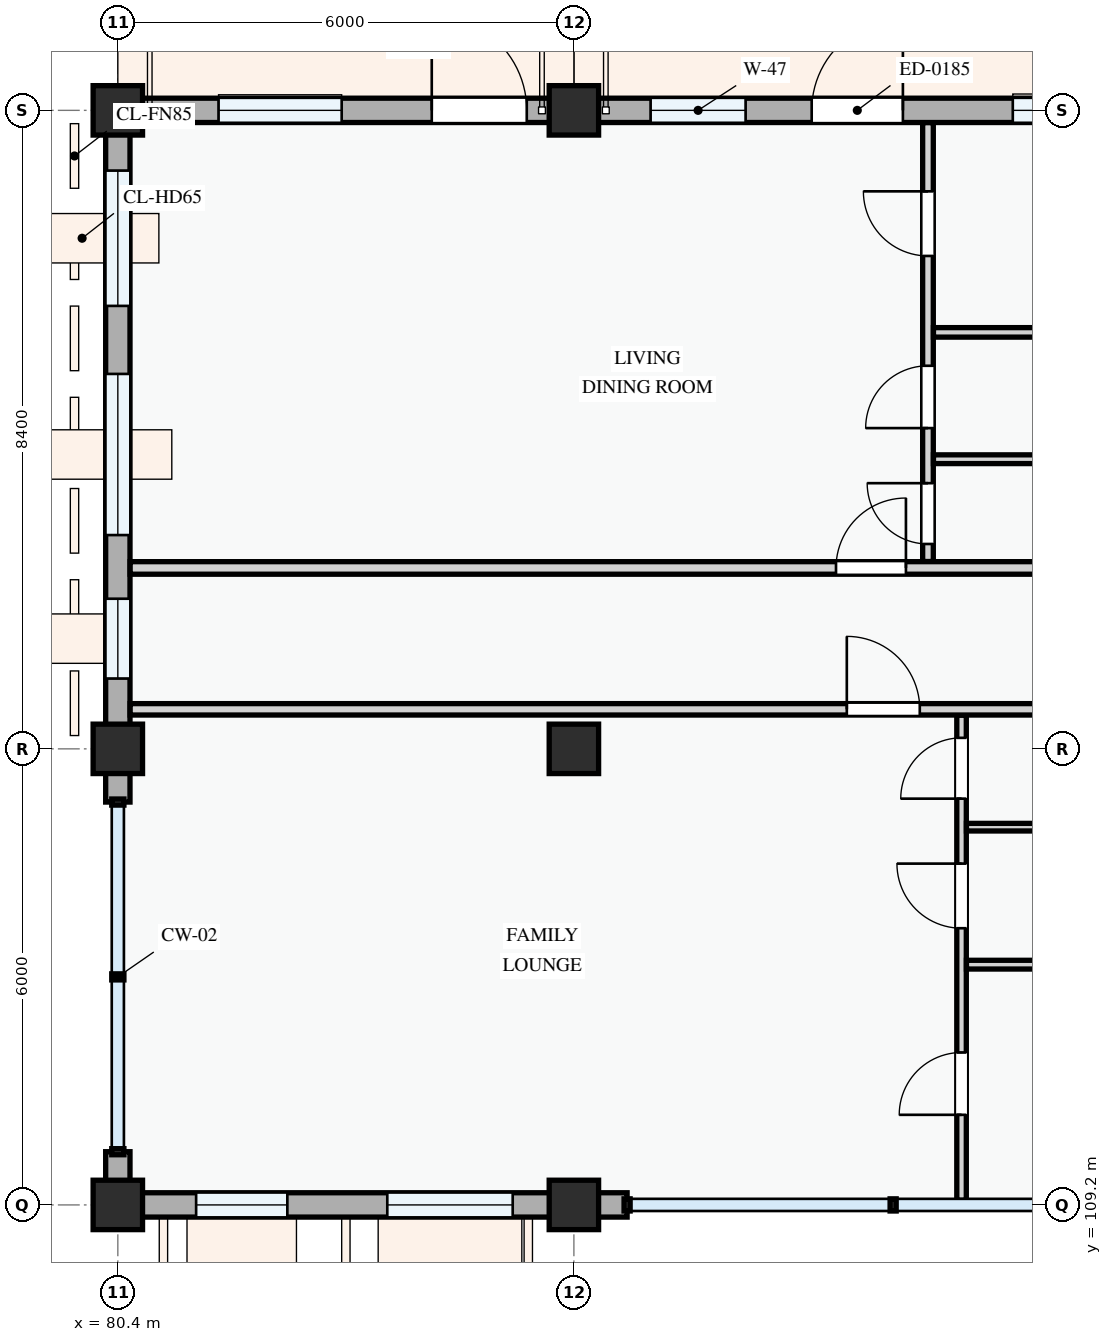
"""IFC4 building model, lengths in metres.
Left out: names, types, materials, properties, quantities, classifications, styles, units other than length and angle.
Written with IfcOpenShell. Run it as: python <this file> out.ifc"""

import sys

from ifc_helpers import new_model, si_unit, direction, frame, frame_2d, origin, origin_2d, place, context, subcontext, project, spatial, rectangle, extrude, element, fill, save


model = new_model("IFC4")
c1 = context("Model", 3, precision=1e-05, world=origin(), true_north=direction((0.0, 1.0)))
c2 = subcontext(c1, "Body", "Model", "MODEL_VIEW")
j1 = project(units=[si_unit("LENGTHUNIT", "METRE"), si_unit("PLANEANGLEUNIT", "RADIAN")], contexts=[c1])
p1 = place(None, origin())
s1 = spatial("IfcSite", under=j1, at=p1, CompositionType="ELEMENT")
p2 = place(p1, origin())
s2 = spatial("IfcBuilding", under=s1, at=p2, CompositionType="ELEMENT")
p3 = place(p2, frame((0.0, 0.0, 18.0)))
s3 = spatial("IfcBuildingStorey", under=s2, at=p3, CompositionType="ELEMENT", Elevation=18.0)
for number, where, z_axis, x_axis in (
    (1, (80.4, 109.2, 0.0), (0.0, 0.0, 1.0), (1.0, 0.0, 0.0)),
    (2, (80.4, 115.2, 0.0), (0.0, 0.0, 1.0), (1.0, 0.0, 0.0)),
    (3, (80.4, 123.6, 0.0), (0.0, 0.0, 1.0), (1.0, 0.0, 0.0)),
    (4, (86.4, 109.2, 0.0), (0.0, 0.0, 1.0), (1.0, 0.0, 0.0)),
    (5, (86.4, 115.2, 0.0), (0.0, 0.0, 1.0), (1.0, 0.0, 0.0)),
    (6, (86.4, 123.6, 0.0), (0.0, 0.0, 1.0), (1.0, 0.0, 0.0)),
):
    element("IfcColumn", number, at=place(p3, frame(where, z_axis=z_axis, x_axis=x_axis)), inside=s3, PredefinedType="COLUMN", context=c2, shape_type="SweptSolid", body=[
        extrude(rectangle(XDim=0.65, YDim=0.65, at=origin_2d()), origin(), (0.0, 0.0, 1.0), 3.3),
    ])
p4 = place(p3, frame((94.8, 123.6, 0.0), z_axis=(0.0, 0.0, 1.0), x_axis=(-1.0, 0.0, 0.0)))
e7 = element("IfcWall", 7, at=p4, inside=s3, PredefinedType="STANDARD", context=c2, shape_type="SweptSolid", body=[
    extrude(rectangle(XDim=8.4, YDim=0.32, at=frame_2d((4.2, 0.0))), origin(), (0.0, 0.0, 1.0), 2.375),
])
p5 = place(p4, frame((4.072, 0.0, 0.0)))
e8 = element("IfcOpeningElement", 8, at=p5, cuts=e7, PredefinedType="OPENING", context=c2, shape_type="SweptSolid", body=[
    extrude(rectangle(XDim=1.2, YDim=2.15, at=frame_2d((0.6, 1.075))), frame((0.0, 0.17, 0.0), z_axis=(0.0, -1.0, 0.0), x_axis=(1.0, 0.0, 0.0)), (0.0, 0.0, 1.0), 0.34),
])
p6 = place(p4, frame((1.306, 0.0, 0.78)))
e9 = element("IfcOpeningElement", 9, at=p6, cuts=e7, PredefinedType="OPENING", context=c2, shape_type="SweptSolid", body=[
    extrude(rectangle(XDim=1.32, YDim=1.35, at=frame_2d((0.66, 0.675))), frame((0.0, 0.17, 0.0), z_axis=(0.0, -1.0, 0.0), x_axis=(1.0, 0.0, 0.0)), (0.0, 0.0, 1.0), 0.34),
])
p7 = place(p4, frame((6.141, 0.0, 0.78)))
e10 = element("IfcOpeningElement", 10, at=p7, cuts=e7, PredefinedType="OPENING", context=c2, shape_type="SweptSolid", body=[
    extrude(rectangle(XDim=1.25, YDim=1.45, at=frame_2d((0.625, 0.725))), frame((0.0, 0.17, 0.0), z_axis=(0.0, -1.0, 0.0), x_axis=(1.0, 0.0, 0.0)), (0.0, 0.0, 1.0), 0.34),
])
p8 = place(p3, frame((86.4, 123.6, 0.0), z_axis=(0.0, 0.0, 1.0), x_axis=(-1.0, 0.0, 0.0)))
e11 = element("IfcWall", 11, at=p8, inside=s3, PredefinedType="STANDARD", context=c2, shape_type="SweptSolid", body=[
    extrude(rectangle(XDim=6.0, YDim=0.32, at=frame_2d((3.0, 0.0))), origin(), (0.0, 0.0, 1.0), 2.475),
])
p9 = place(p8, frame((0.62, 0.0, 0.0)))
e12 = element("IfcOpeningElement", 12, at=p9, cuts=e11, PredefinedType="OPENING", context=c2, shape_type="SweptSolid", body=[
    extrude(rectangle(XDim=1.25, YDim=2.2, at=frame_2d((0.625, 1.1))), frame((0.0, 0.17, 0.0), z_axis=(0.0, -1.0, 0.0), x_axis=(1.0, 0.0, 0.0)), (0.0, 0.0, 1.0), 0.34),
])
p10 = place(p8, frame((3.055, 0.0, 0.78)))
e13 = element("IfcOpeningElement", 13, at=p10, cuts=e11, PredefinedType="OPENING", context=c2, shape_type="SweptSolid", body=[
    extrude(rectangle(XDim=1.62, YDim=1.38, at=frame_2d((0.81, 0.69))), frame((0.0, 0.17, 0.0), z_axis=(0.0, -1.0, 0.0), x_axis=(1.0, 0.0, 0.0)), (0.0, 0.0, 1.0), 0.34),
])
p11 = place(p3, frame((80.4, 123.6, 0.0), z_axis=(0.0, 0.0, 1.0), x_axis=(0.0, -1.0, 0.0)))
e14 = element("IfcWall", 14, at=p11, inside=s3, PredefinedType="STANDARD", context=c2, shape_type="SweptSolid", body=[
    extrude(rectangle(XDim=8.4, YDim=0.32, at=frame_2d((4.2, 0.0))), origin(), (0.0, 0.0, 1.0), 2.425),
])
p12 = place(p11, frame((0.792, 0.0, 0.78)))
e15 = element("IfcOpeningElement", 15, at=p12, cuts=e14, PredefinedType="OPENING", context=c2, shape_type="SweptSolid", body=[
    extrude(rectangle(XDim=1.78, YDim=1.42, at=frame_2d((0.89, 0.71))), frame((0.0, 0.17, 0.0), z_axis=(0.0, -1.0, 0.0), x_axis=(1.0, 0.0, 0.0)), (0.0, 0.0, 1.0), 0.34),
])
p13 = place(p11, frame((3.468, 0.0, 0.78)))
e16 = element("IfcOpeningElement", 16, at=p13, cuts=e14, PredefinedType="OPENING", context=c2, shape_type="SweptSolid", body=[
    extrude(rectangle(XDim=2.12, YDim=1.44, at=frame_2d((1.06, 0.72))), frame((0.0, 0.17, 0.0), z_axis=(0.0, -1.0, 0.0), x_axis=(1.0, 0.0, 0.0)), (0.0, 0.0, 1.0), 0.34),
])
p14 = place(p11, frame((6.425, 0.0, 0.78)))
e17 = element("IfcOpeningElement", 17, at=p14, cuts=e14, PredefinedType="OPENING", context=c2, shape_type="SweptSolid", body=[
    extrude(rectangle(XDim=1.05, YDim=1.2, at=frame_2d((0.525, 0.6))), frame((0.0, 0.17, 0.0), z_axis=(0.0, -1.0, 0.0), x_axis=(1.0, 0.0, 0.0)), (0.0, 0.0, 1.0), 0.34),
])
p15 = place(p3, frame((80.4, 115.2, 0.0), z_axis=(0.0, 0.0, 1.0), x_axis=(0.0, -1.0, 0.0)))
e18 = element("IfcWall", 18, at=p15, inside=s3, PredefinedType="STANDARD", context=c2, shape_type="SweptSolid", body=[
    extrude(rectangle(XDim=0.7, YDim=0.32, at=frame_2d((0.35, 0.0))), origin(), (0.0, 0.0, 1.0), 2.575),
])
p16 = place(p3, frame((80.4, 109.9, 0.0), z_axis=(0.0, 0.0, 1.0), x_axis=(0.0, -1.0, 0.0)))
e19 = element("IfcWall", 19, at=p16, inside=s3, PredefinedType="STANDARD", context=c2, shape_type="SweptSolid", body=[
    extrude(rectangle(XDim=0.538, YDim=0.32, at=frame_2d((0.269, 0.0))), origin(), (0.0, 0.0, 1.0), 2.575),
])
p17 = place(p3, frame((80.4, 109.2, 0.0), z_axis=(0.0, 0.0, 1.0), x_axis=(1.0, 0.0, 0.0)))
e20 = element("IfcWall", 20, at=p17, inside=s3, PredefinedType="STANDARD", context=c2, shape_type="SweptSolid", body=[
    extrude(rectangle(XDim=6.0, YDim=0.32, at=frame_2d((3.0, 0.0))), origin(), (0.0, 0.0, 1.0), 2.475),
])
p18 = place(p17, frame((1.03, 0.0, 0.78)))
e21 = element("IfcOpeningElement", 21, at=p18, cuts=e20, PredefinedType="OPENING", context=c2, shape_type="SweptSolid", body=[
    extrude(rectangle(XDim=1.2, YDim=1.5, at=frame_2d((0.6, 0.75))), frame((0.0, 0.17, 0.0), z_axis=(0.0, -1.0, 0.0), x_axis=(1.0, 0.0, 0.0)), (0.0, 0.0, 1.0), 0.34),
])
p19 = place(p17, frame((3.545, 0.0, 0.78)))
e22 = element("IfcOpeningElement", 22, at=p19, cuts=e20, PredefinedType="OPENING", context=c2, shape_type="SweptSolid", body=[
    extrude(rectangle(XDim=1.65, YDim=1.5, at=frame_2d((0.825, 0.75))), frame((0.0, 0.17, 0.0), z_axis=(0.0, -1.0, 0.0), x_axis=(1.0, 0.0, 0.0)), (0.0, 0.0, 1.0), 0.34),
])
p20 = place(p3, frame((86.4, 109.2, 0.0), z_axis=(0.0, 0.0, 1.0), x_axis=(1.0, 0.0, 0.0)))
e23 = element("IfcWall", 23, at=p20, inside=s3, PredefinedType="STANDARD", context=c2, shape_type="SweptSolid", body=[
    extrude(rectangle(XDim=0.7, YDim=0.32, at=frame_2d((0.35, 0.0))), origin(), (0.0, 0.0, 1.0), 2.375),
])
p21 = place(p3, frame((91.5, 109.26, 0.0), z_axis=(0.0, 0.0, 1.0), x_axis=(0.0, 1.0, 0.0)))
e24 = element("IfcWall", 24, at=p21, inside=s3, PredefinedType="PARTITIONING", context=c2, shape_type="SweptSolid", body=[
    extrude(rectangle(XDim=6.383, YDim=0.125, at=frame_2d((3.191, 0.0))), origin(), (0.0, 0.0, 1.0), 3.0),
])
p22 = place(p21, frame((1.125, 0.0, 0.0)))
e25 = element("IfcOpeningElement", 25, at=p22, cuts=e24, PredefinedType="OPENING", context=c2, shape_type="SweptSolid", body=[
    extrude(rectangle(XDim=0.82, YDim=2.08, at=frame_2d((0.41, 1.04))), frame((0.0, 0.073, 0.0), z_axis=(0.0, -1.0, 0.0), x_axis=(1.0, 0.0, 0.0)), (0.0, 0.0, 1.0), 0.145),
])
p23 = place(p21, frame((3.58, 0.0, 0.0)))
e26 = element("IfcOpeningElement", 26, at=p23, cuts=e24, PredefinedType="OPENING", context=c2, shape_type="SweptSolid", body=[
    extrude(rectangle(XDim=0.85, YDim=2.1, at=frame_2d((0.425, 1.05))), frame((0.0, 0.073, 0.0), z_axis=(0.0, -1.0, 0.0), x_axis=(1.0, 0.0, 0.0)), (0.0, 0.0, 1.0), 0.145),
])
p24 = place(p21, frame((5.285, 0.0, 0.0)))
e27 = element("IfcOpeningElement", 27, at=p24, cuts=e24, PredefinedType="OPENING", context=c2, shape_type="SweptSolid", body=[
    extrude(rectangle(XDim=0.8, YDim=2.1, at=frame_2d((0.4, 1.05))), frame((0.0, 0.073, 0.0), z_axis=(0.0, -1.0, 0.0), x_axis=(1.0, 0.0, 0.0)), (0.0, 0.0, 1.0), 0.145),
])
p25 = place(p3, frame((91.564, 112.361, 0.0), z_axis=(0.0, 0.0, 1.0), x_axis=(1.0, 0.0, 0.0)))
e28 = element("IfcWall", 28, at=p25, inside=s3, PredefinedType="PARTITIONING", context=c2, shape_type="SweptSolid", body=[
    extrude(rectangle(XDim=10.874, YDim=0.115, at=frame_2d((5.437, 0.0))), origin(), (0.0, 0.0, 1.0), 3.0),
])
p26 = place(p3, frame((91.564, 114.17, 0.0), z_axis=(0.0, 0.0, 1.0), x_axis=(1.0, 0.0, 0.0)))
e29 = element("IfcWall", 29, at=p26, inside=s3, PredefinedType="PARTITIONING", context=c2, shape_type="SweptSolid", body=[
    extrude(rectangle(XDim=10.874, YDim=0.1, at=frame_2d((5.437, 0.0))), origin(), (0.0, 0.0, 1.0), 3.0),
])
p27 = place(p3, frame((91.058, 117.665, 0.0), z_axis=(0.0, 0.0, 1.0), x_axis=(0.0, 1.0, 0.0)))
e30 = element("IfcWall", 30, at=p27, inside=s3, PredefinedType="PARTITIONING", context=c2, shape_type="SweptSolid", body=[
    extrude(rectangle(XDim=5.773, YDim=0.14, at=frame_2d((2.887, 0.0))), origin(), (0.0, 0.0, 1.0), 3.0),
])
p28 = place(p27, frame((0.231, 0.0, 0.0)))
e31 = element("IfcOpeningElement", 31, at=p28, cuts=e30, PredefinedType="OPENING", context=c2, shape_type="SweptSolid", body=[
    extrude(rectangle(XDim=0.8, YDim=2.1, at=frame_2d((0.4, 1.05))), frame((0.0, 0.08, 0.0), z_axis=(0.0, -1.0, 0.0), x_axis=(1.0, 0.0, 0.0)), (0.0, 0.0, 1.0), 0.16),
])
p29 = place(p27, frame((1.755, 0.0, 0.0)))
e32 = element("IfcOpeningElement", 32, at=p29, cuts=e30, PredefinedType="OPENING", context=c2, shape_type="SweptSolid", body=[
    extrude(rectangle(XDim=0.82, YDim=2.08, at=frame_2d((0.41, 1.04))), frame((0.0, 0.08, 0.0), z_axis=(0.0, -1.0, 0.0), x_axis=(1.0, 0.0, 0.0)), (0.0, 0.0, 1.0), 0.16),
])
p30 = place(p27, frame((4.02, 0.0, 0.0)))
e33 = element("IfcOpeningElement", 33, at=p30, cuts=e30, PredefinedType="OPENING", context=c2, shape_type="SweptSolid", body=[
    extrude(rectangle(XDim=0.85, YDim=2.1, at=frame_2d((0.425, 1.05))), frame((0.0, 0.08, 0.0), z_axis=(0.0, -1.0, 0.0), x_axis=(1.0, 0.0, 0.0)), (0.0, 0.0, 1.0), 0.16),
])
p31 = place(p3, frame((91.13, 120.679, 0.0), z_axis=(0.0, 0.0, 1.0), x_axis=(1.0, 0.0, 0.0)))
e34 = element("IfcWall", 34, at=p31, inside=s3, PredefinedType="PARTITIONING", context=c2, shape_type="SweptSolid", body=[
    extrude(rectangle(XDim=11.298, YDim=0.125, at=frame_2d((5.649, 0.0))), origin(), (0.0, 0.0, 1.0), 3.0),
])
p32 = place(p3, frame((91.13, 119.01, 0.0), z_axis=(0.0, 0.0, 1.0), x_axis=(1.0, 0.0, 0.0)))
e35 = element("IfcWall", 35, at=p32, inside=s3, PredefinedType="PARTITIONING", context=c2, shape_type="SweptSolid", body=[
    extrude(rectangle(XDim=11.298, YDim=0.115, at=frame_2d((5.649, 0.0))), origin(), (0.0, 0.0, 1.0), 3.0),
])
p33 = place(p3, frame((80.562, 115.72, 0.0), z_axis=(0.0, 0.0, 1.0), x_axis=(1.0, 0.0, 0.0)))
e36 = element("IfcWall", 36, at=p33, inside=s3, PredefinedType="PARTITIONING", context=c2, shape_type="SweptSolid", body=[
    extrude(rectangle(XDim=69.488, YDim=0.15, at=frame_2d((34.744, 0.0))), origin(), (0.0, 0.0, 1.0), 3.0),
])
p34 = place(p33, frame((9.429, 0.0, 0.0)))
e37 = element("IfcOpeningElement", 37, at=p34, cuts=e36, PredefinedType="OPENING", context=c2, shape_type="SweptSolid", body=[
    extrude(rectangle(XDim=0.96, YDim=2.12, at=frame_2d((0.48, 1.06))), frame((0.0, 0.085, 0.0), z_axis=(0.0, -1.0, 0.0), x_axis=(1.0, 0.0, 0.0)), (0.0, 0.0, 1.0), 0.17),
])
p35 = place(p33, frame((24.004, 0.0, 0.0)))
e38 = element("IfcOpeningElement", 38, at=p35, cuts=e36, PredefinedType="OPENING", context=c2, shape_type="SweptSolid", body=[
    extrude(rectangle(XDim=0.92, YDim=2.1, at=frame_2d((0.46, 1.05))), frame((0.0, 0.085, 0.0), z_axis=(0.0, -1.0, 0.0), x_axis=(1.0, 0.0, 0.0)), (0.0, 0.0, 1.0), 0.17),
])
p36 = place(p33, frame((52.697, 0.0, 0.0)))
e39 = element("IfcOpeningElement", 39, at=p36, cuts=e36, PredefinedType="OPENING", context=c2, shape_type="SweptSolid", body=[
    extrude(rectangle(XDim=0.92, YDim=2.1, at=frame_2d((0.46, 1.05))), frame((0.0, 0.085, 0.0), z_axis=(0.0, -1.0, 0.0), x_axis=(1.0, 0.0, 0.0)), (0.0, 0.0, 1.0), 0.17),
])
p37 = place(p3, frame((80.562, 117.58, 0.0), z_axis=(0.0, 0.0, 1.0), x_axis=(1.0, 0.0, 0.0)))
e40 = element("IfcWall", 40, at=p37, inside=s3, PredefinedType="PARTITIONING", context=c2, shape_type="SweptSolid", body=[
    extrude(rectangle(XDim=71.978, YDim=0.165, at=frame_2d((35.989, 0.0))), origin(), (0.0, 0.0, 1.0), 3.0),
])
p38 = place(p37, frame((9.286, 0.0, 0.0)))
e41 = element("IfcOpeningElement", 41, at=p38, cuts=e40, PredefinedType="OPENING", context=c2, shape_type="SweptSolid", body=[
    extrude(rectangle(XDim=0.92, YDim=2.1, at=frame_2d((0.46, 1.05))), frame((0.0, 0.093, 0.0), z_axis=(0.0, -1.0, 0.0), x_axis=(1.0, 0.0, 0.0)), (0.0, 0.0, 1.0), 0.185),
])
p39 = place(p37, frame((23.993, 0.0, 0.0)))
e42 = element("IfcOpeningElement", 42, at=p39, cuts=e40, PredefinedType="OPENING", context=c2, shape_type="SweptSolid", body=[
    extrude(rectangle(XDim=0.92, YDim=2.1, at=frame_2d((0.46, 1.05))), frame((0.0, 0.093, 0.0), z_axis=(0.0, -1.0, 0.0), x_axis=(1.0, 0.0, 0.0)), (0.0, 0.0, 1.0), 0.185),
])
p40 = place(p37, frame((52.703, 0.0, 0.0)))
e43 = element("IfcOpeningElement", 43, at=p40, cuts=e40, PredefinedType="OPENING", context=c2, shape_type="SweptSolid", body=[
    extrude(rectangle(XDim=0.96, YDim=2.12, at=frame_2d((0.48, 1.06))), frame((0.0, 0.093, 0.0), z_axis=(0.0, -1.0, 0.0), x_axis=(1.0, 0.0, 0.0)), (0.0, 0.0, 1.0), 0.185),
])
p41 = place(p5, frame((1.2, 0.0, 0.0), z_axis=(0.0, 0.0, 1.0), x_axis=(-1.0, 0.0, 0.0)))
e44 = element("IfcDoor", 44, at=p41, inside=s3, OperationType="SINGLE_SWING_RIGHT", PredefinedType="DOOR", context=c2, shape_type="SweptSolid", body=[
    extrude(rectangle(XDim=1.2, YDim=2.15, at=frame_2d((0.6, 1.075))), frame((0.0, 0.025, 0.0), z_axis=(0.0, -1.0, 0.0), x_axis=(1.0, 0.0, 0.0)), (0.0, 0.0, 1.0), 0.05),
])
fill(e8, e44)
p42 = place(p6, origin())
e45 = element("IfcWindow", 45, at=p42, inside=s3, PartitioningType="SINGLE_PANEL", PredefinedType="WINDOW", context=c2, shape_type="SweptSolid", body=[
    extrude(rectangle(XDim=1.32, YDim=1.35, at=frame_2d((0.66, 0.675))), frame((0.0, 0.03, 0.0), z_axis=(0.0, -1.0, 0.0), x_axis=(1.0, 0.0, 0.0)), (0.0, 0.0, 1.0), 0.06),
])
fill(e9, e45)
p43 = place(p7, origin())
e46 = element("IfcWindow", 46, at=p43, inside=s3, PartitioningType="SINGLE_PANEL", PredefinedType="WINDOW", context=c2, shape_type="SweptSolid", body=[
    extrude(rectangle(XDim=1.25, YDim=1.45, at=frame_2d((0.625, 0.725))), frame((0.0, 0.03, 0.0), z_axis=(0.0, -1.0, 0.0), x_axis=(1.0, 0.0, 0.0)), (0.0, 0.0, 1.0), 0.06),
])
fill(e10, e46)
p44 = place(p9, frame((1.25, 0.0, 0.0), z_axis=(0.0, 0.0, 1.0), x_axis=(-1.0, 0.0, 0.0)))
e47 = element("IfcDoor", 47, at=p44, inside=s3, OperationType="SINGLE_SWING_LEFT", PredefinedType="DOOR", context=c2, shape_type="SweptSolid", body=[
    extrude(rectangle(XDim=1.25, YDim=2.2, at=frame_2d((0.625, 1.1))), frame((0.0, 0.025, 0.0), z_axis=(0.0, -1.0, 0.0), x_axis=(1.0, 0.0, 0.0)), (0.0, 0.0, 1.0), 0.05),
])
fill(e12, e47)
p45 = place(p10, origin())
e48 = element("IfcWindow", 48, at=p45, inside=s3, PartitioningType="DOUBLE_PANEL_VERTICAL", PredefinedType="WINDOW", context=c2, shape_type="SweptSolid", body=[
    extrude(rectangle(XDim=1.62, YDim=1.38, at=frame_2d((0.81, 0.69))), frame((0.0, 0.03, 0.0), z_axis=(0.0, -1.0, 0.0), x_axis=(1.0, 0.0, 0.0)), (0.0, 0.0, 1.0), 0.06),
])
fill(e13, e48)
p46 = place(p12, origin())
e49 = element("IfcWindow", 49, at=p46, inside=s3, PartitioningType="DOUBLE_PANEL_VERTICAL", PredefinedType="WINDOW", context=c2, shape_type="SweptSolid", body=[
    extrude(rectangle(XDim=1.78, YDim=1.42, at=frame_2d((0.89, 0.71))), frame((0.0, 0.03, 0.0), z_axis=(0.0, -1.0, 0.0), x_axis=(1.0, 0.0, 0.0)), (0.0, 0.0, 1.0), 0.06),
])
fill(e15, e49)
p47 = place(p13, origin())
e50 = element("IfcWindow", 50, at=p47, inside=s3, PartitioningType="DOUBLE_PANEL_VERTICAL", PredefinedType="WINDOW", context=c2, shape_type="SweptSolid", body=[
    extrude(rectangle(XDim=2.12, YDim=1.44, at=frame_2d((1.06, 0.72))), frame((0.0, 0.03, 0.0), z_axis=(0.0, -1.0, 0.0), x_axis=(1.0, 0.0, 0.0)), (0.0, 0.0, 1.0), 0.06),
])
fill(e16, e50)
p48 = place(p14, origin())
e51 = element("IfcWindow", 51, at=p48, inside=s3, PartitioningType="SINGLE_PANEL", PredefinedType="WINDOW", context=c2, shape_type="SweptSolid", body=[
    extrude(rectangle(XDim=1.05, YDim=1.2, at=frame_2d((0.525, 0.6))), frame((0.0, 0.03, 0.0), z_axis=(0.0, -1.0, 0.0), x_axis=(1.0, 0.0, 0.0)), (0.0, 0.0, 1.0), 0.06),
])
fill(e17, e51)
p49 = place(p18, origin())
e52 = element("IfcWindow", 52, at=p49, inside=s3, PartitioningType="SINGLE_PANEL", PredefinedType="WINDOW", context=c2, shape_type="SweptSolid", body=[
    extrude(rectangle(XDim=1.2, YDim=1.5, at=frame_2d((0.6, 0.75))), frame((0.0, 0.03, 0.0), z_axis=(0.0, -1.0, 0.0), x_axis=(1.0, 0.0, 0.0)), (0.0, 0.0, 1.0), 0.06),
])
fill(e21, e52)
p50 = place(p19, origin())
e53 = element("IfcWindow", 53, at=p50, inside=s3, PartitioningType="DOUBLE_PANEL_VERTICAL", PredefinedType="WINDOW", context=c2, shape_type="SweptSolid", body=[
    extrude(rectangle(XDim=1.65, YDim=1.5, at=frame_2d((0.825, 0.75))), frame((0.0, 0.03, 0.0), z_axis=(0.0, -1.0, 0.0), x_axis=(1.0, 0.0, 0.0)), (0.0, 0.0, 1.0), 0.06),
])
fill(e22, e53)
p51 = place(p22, origin())
e54 = element("IfcDoor", 54, at=p51, inside=s3, OperationType="SINGLE_SWING_LEFT", PredefinedType="DOOR", context=c2, shape_type="SweptSolid", body=[
    extrude(rectangle(XDim=0.82, YDim=2.08, at=frame_2d((0.41, 1.04))), frame((0.0, 0.025, 0.0), z_axis=(0.0, -1.0, 0.0), x_axis=(1.0, 0.0, 0.0)), (0.0, 0.0, 1.0), 0.05),
])
fill(e25, e54)
p52 = place(p23, origin())
e55 = element("IfcDoor", 55, at=p52, inside=s3, OperationType="SINGLE_SWING_RIGHT", PredefinedType="DOOR", context=c2, shape_type="SweptSolid", body=[
    extrude(rectangle(XDim=0.85, YDim=2.1, at=frame_2d((0.425, 1.05))), frame((0.0, 0.025, 0.0), z_axis=(0.0, -1.0, 0.0), x_axis=(1.0, 0.0, 0.0)), (0.0, 0.0, 1.0), 0.05),
])
fill(e26, e55)
p53 = place(p24, origin())
e56 = element("IfcDoor", 56, at=p53, inside=s3, OperationType="SINGLE_SWING_LEFT", PredefinedType="DOOR", context=c2, shape_type="SweptSolid", body=[
    extrude(rectangle(XDim=0.8, YDim=2.1, at=frame_2d((0.4, 1.05))), frame((0.0, 0.025, 0.0), z_axis=(0.0, -1.0, 0.0), x_axis=(1.0, 0.0, 0.0)), (0.0, 0.0, 1.0), 0.05),
])
fill(e27, e56)
p54 = place(p28, origin())
e57 = element("IfcDoor", 57, at=p54, inside=s3, OperationType="SINGLE_SWING_RIGHT", PredefinedType="DOOR", context=c2, shape_type="SweptSolid", body=[
    extrude(rectangle(XDim=0.8, YDim=2.1, at=frame_2d((0.4, 1.05))), frame((0.0, 0.025, 0.0), z_axis=(0.0, -1.0, 0.0), x_axis=(1.0, 0.0, 0.0)), (0.0, 0.0, 1.0), 0.05),
])
fill(e31, e57)
p55 = place(p29, origin())
e58 = element("IfcDoor", 58, at=p55, inside=s3, OperationType="SINGLE_SWING_LEFT", PredefinedType="DOOR", context=c2, shape_type="SweptSolid", body=[
    extrude(rectangle(XDim=0.82, YDim=2.08, at=frame_2d((0.41, 1.04))), frame((0.0, 0.025, 0.0), z_axis=(0.0, -1.0, 0.0), x_axis=(1.0, 0.0, 0.0)), (0.0, 0.0, 1.0), 0.05),
])
fill(e32, e58)
p56 = place(p30, origin())
e59 = element("IfcDoor", 59, at=p56, inside=s3, OperationType="SINGLE_SWING_RIGHT", PredefinedType="DOOR", context=c2, shape_type="SweptSolid", body=[
    extrude(rectangle(XDim=0.85, YDim=2.1, at=frame_2d((0.425, 1.05))), frame((0.0, 0.025, 0.0), z_axis=(0.0, -1.0, 0.0), x_axis=(1.0, 0.0, 0.0)), (0.0, 0.0, 1.0), 0.05),
])
fill(e33, e59)
p57 = place(p34, origin())
e60 = element("IfcDoor", 60, at=p57, inside=s3, OperationType="SINGLE_SWING_LEFT", PredefinedType="DOOR", context=c2, shape_type="SweptSolid", body=[
    extrude(rectangle(XDim=0.96, YDim=2.12, at=frame_2d((0.48, 1.06))), frame((0.0, 0.025, 0.0), z_axis=(0.0, -1.0, 0.0), x_axis=(1.0, 0.0, 0.0)), (0.0, 0.0, 1.0), 0.05),
])
fill(e37, e60)
p58 = place(p38, origin())
e61 = element("IfcDoor", 61, at=p58, inside=s3, OperationType="SINGLE_SWING_RIGHT", PredefinedType="DOOR", context=c2, shape_type="SweptSolid", body=[
    extrude(rectangle(XDim=0.92, YDim=2.1, at=frame_2d((0.46, 1.05))), frame((0.0, 0.025, 0.0), z_axis=(0.0, -1.0, 0.0), x_axis=(1.0, 0.0, 0.0)), (0.0, 0.0, 1.0), 0.05),
])
fill(e41, e61)
save(model, sys.argv[1])
